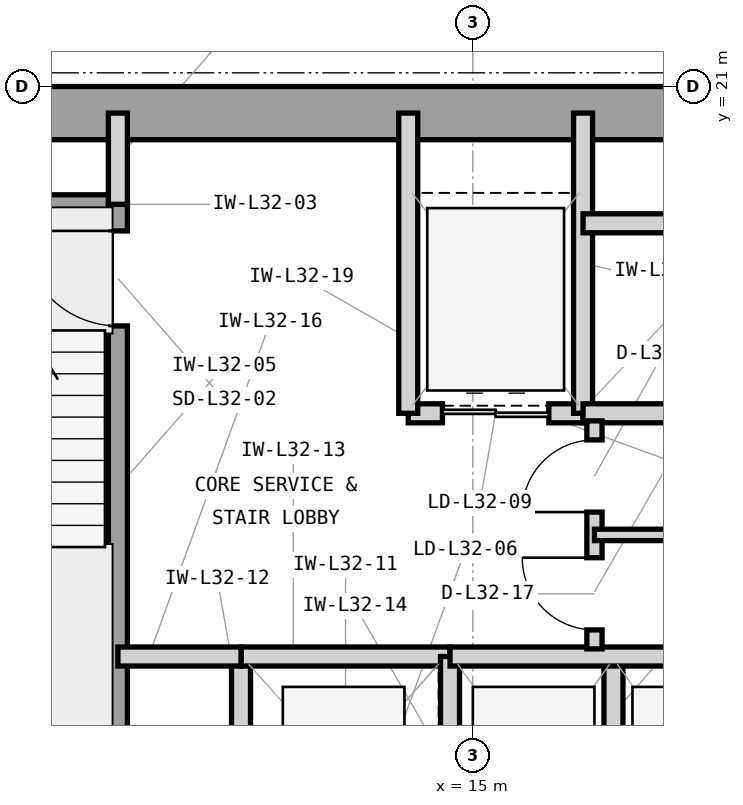
"""IFC4 building model, lengths in metres.
Left out: names, types, materials, properties, quantities, classifications, styles, units other than length and angle.
Written with IfcOpenShell. Run it as: python <this file> out.ifc"""

import sys

from ifc_helpers import new_model, si_unit, direction, frame, frame_2d, origin, place, context, subcontext, project, spatial, rectangle, extrude, element, fill, save


model = new_model("IFC4")
c1 = context("Model", 3, precision=1e-05, world=origin(), true_north=direction((0.0, 1.0)))
c2 = subcontext(c1, "Body", "Model", "MODEL_VIEW")
j1 = project(units=[si_unit("LENGTHUNIT", "METRE"), si_unit("PLANEANGLEUNIT", "RADIAN")], contexts=[c1])
p1 = place(None, origin())
s1 = spatial("IfcSite", under=j1, at=p1, CompositionType="ELEMENT")
p2 = place(p1, origin())
s2 = spatial("IfcBuilding", under=s1, at=p2, CompositionType="ELEMENT")
p3 = place(p2, frame((0.0, 0.0, 136.2)))
s3 = spatial("IfcBuildingStorey", under=s2, at=p3, CompositionType="ELEMENT", Elevation=136.2)
p4 = place(p3, frame((7.475, 20.65, 0.0), z_axis=(0.0, 0.0, 1.0), x_axis=(1.0, 0.0, 0.0)))
e1 = element("IfcWall", 1, at=p4, inside=s3, PredefinedType="SHEAR", context=c2, shape_type="SweptSolid", body=[
    extrude(rectangle(XDim=12.325, YDim=0.7, at=frame_2d((6.163, 0.0))), origin(), (0.0, 0.0, 1.0), 3.9),
])
p5 = place(p3, frame((7.7, 19.45, 0.0), z_axis=(0.0, 0.0, 1.0), x_axis=(1.0, 0.0, 0.0)))
e2 = element("IfcWall", 2, at=p5, inside=s3, PredefinedType="SHEAR", context=c2, shape_type="SweptSolid", body=[
    extrude(rectangle(XDim=2.755, YDim=0.25, at=frame_2d((1.377, 0.0))), origin(), (0.0, 0.0, 1.0), 3.9),
])
p6 = place(p3, frame((10.33, 12.0, 0.0), z_axis=(0.0, 0.0, 1.0), x_axis=(0.0, 1.0, 0.0)))
e3 = element("IfcWall", 3, at=p6, inside=s3, PredefinedType="SHEAR", context=c2, shape_type="SweptSolid", body=[
    extrude(rectangle(XDim=7.45, YDim=0.25, at=frame_2d((3.725, 0.0))), origin(), (0.0, 0.0, 1.0), 3.9),
])
p7 = place(p6, frame((5.85, 0.0, 0.0)))
e4 = element("IfcOpeningElement", 4, at=p7, cuts=e3, PredefinedType="OPENING", context=c2, shape_type="SweptSolid", body=[
    extrude(rectangle(XDim=1.25, YDim=2.2, at=frame_2d((0.625, 1.1))), frame((0.0, 0.135, 0.0), z_axis=(0.0, -1.0, 0.0), x_axis=(1.0, 0.0, 0.0)), (0.0, 0.0, 1.0), 0.27),
])
p8 = place(p3, frame((10.33, 19.45, 0.0), z_axis=(0.0, 0.0, 1.0), x_axis=(0.0, 1.0, 0.0)))
e5 = element("IfcWall", 5, at=p8, inside=s3, PredefinedType="PARTITIONING", context=c2, shape_type="SweptSolid", body=[
    extrude(rectangle(XDim=1.2, YDim=0.25, at=frame_2d((0.6, 0.0))), origin(), (0.0, 0.0, 1.0), 2.994),
])
p9 = place(p3, frame((11.95, 10.5, 0.0), z_axis=(0.0, 0.0, 1.0), x_axis=(0.0, 1.0, 0.0)))
e6 = element("IfcWall", 6, at=p9, inside=s3, PredefinedType="PARTITIONING", context=c2, shape_type="SweptSolid", body=[
    extrude(rectangle(XDim=3.0, YDim=0.25, at=frame_2d((1.5, 0.0))), origin(), (0.0, 0.0, 1.0), 3.69),
])
p10 = place(p3, frame((11.95, 13.5, 0.0), z_axis=(0.0, 0.0, 1.0), x_axis=(1.0, 0.0, 0.0)))
e7 = element("IfcWall", 7, at=p10, inside=s3, PredefinedType="PARTITIONING", context=c2, shape_type="SweptSolid", body=[
    extrude(rectangle(XDim=2.75, YDim=0.25, at=frame_2d((1.375, 0.0))), origin(), (0.0, 0.0, 1.0), 3.233),
])
p11 = place(p3, frame((14.7, 10.5, 0.0), z_axis=(0.0, 0.0, 1.0), x_axis=(0.0, 1.0, 0.0)))
e8 = element("IfcWall", 8, at=p11, inside=s3, PredefinedType="PARTITIONING", context=c2, shape_type="SweptSolid", body=[
    extrude(rectangle(XDim=3.0, YDim=0.25, at=frame_2d((1.5, 0.0))), origin(), (0.0, 0.0, 1.0), 3.69),
])
p12 = place(p3, frame((10.33, 13.5, 0.0), z_axis=(0.0, 0.0, 1.0), x_axis=(1.0, 0.0, 0.0)))
e9 = element("IfcWall", 9, at=p12, inside=s3, PredefinedType="PARTITIONING", context=c2, shape_type="SweptSolid", body=[
    extrude(rectangle(XDim=1.62, YDim=0.25, at=frame_2d((0.81, 0.0))), origin(), (0.0, 0.0, 1.0), 3.233),
])
p13 = place(p3, frame((14.15, 16.7, 0.0), z_axis=(0.0, 0.0, 1.0), x_axis=(1.0, 0.0, 0.0)))
e10 = element("IfcWall", 10, at=p13, inside=s3, PredefinedType="PARTITIONING", context=c2, shape_type="SweptSolid", body=[
    extrude(rectangle(XDim=2.3, YDim=0.25, at=frame_2d((1.15, 0.0))), origin(), (0.0, 0.0, 1.0), 3.233),
])
p14 = place(p13, frame((0.45, 0.0, 0.0)))
e11 = element("IfcOpeningElement", 11, at=p14, cuts=e10, PredefinedType="OPENING", context=c2, shape_type="SweptSolid", body=[
    extrude(rectangle(XDim=1.4, YDim=2.35, at=frame_2d((0.7, 1.175))), frame((0.0, 0.135, 0.0), z_axis=(0.0, -1.0, 0.0), x_axis=(1.0, 0.0, 0.0)), (0.0, 0.0, 1.0), 0.27),
])
for number, where, z_axis, x_axis in (
    (12, (14.15, 16.7, 0.0), (0.0, 0.0, 1.0), (0.0, 1.0, 0.0)),
    (13, (16.45, 16.7, 0.0), (0.0, 0.0, 1.0), (0.0, 1.0, 0.0)),
):
    element("IfcWall", number, at=place(p3, frame(where, z_axis=z_axis, x_axis=x_axis)), inside=s3, PredefinedType="PARTITIONING", context=c2, shape_type="SweptSolid", body=[
        extrude(rectangle(XDim=3.95, YDim=0.25, at=frame_2d((1.975, 0.0))), origin(), (0.0, 0.0, 1.0), 3.69),
    ])
p15 = place(p3, frame((16.45, 16.7, 0.0), z_axis=(0.0, 0.0, 1.0), x_axis=(1.0, 0.0, 0.0)))
e14 = element("IfcWall", 14, at=p15, inside=s3, PredefinedType="PARTITIONING", context=c2, shape_type="SweptSolid", body=[
    extrude(rectangle(XDim=2.3, YDim=0.25, at=frame_2d((1.15, 0.0))), origin(), (0.0, 0.0, 1.0), 3.233),
])
p16 = place(p3, frame((16.45, 19.2, 0.0), z_axis=(0.0, 0.0, 1.0), x_axis=(1.0, 0.0, 0.0)))
e15 = element("IfcWall", 15, at=p16, inside=s3, PredefinedType="PARTITIONING", context=c2, shape_type="SweptSolid", body=[
    extrude(rectangle(XDim=7.2, YDim=0.25, at=frame_2d((3.6, 0.0))), origin(), (0.0, 0.0, 1.0), 3.69),
])
p17 = place(p3, frame((16.85, 10.5, 0.0), z_axis=(0.0, 0.0, 1.0), x_axis=(0.0, 1.0, 0.0)))
e16 = element("IfcWall", 16, at=p17, inside=s3, PredefinedType="PARTITIONING", context=c2, shape_type="SweptSolid", body=[
    extrude(rectangle(XDim=3.0, YDim=0.25, at=frame_2d((1.5, 0.0))), origin(), (0.0, 0.0, 1.0), 3.69),
])
p18 = place(p3, frame((14.7, 13.5, 0.0), z_axis=(0.0, 0.0, 1.0), x_axis=(1.0, 0.0, 0.0)))
e17 = element("IfcWall", 17, at=p18, inside=s3, PredefinedType="PARTITIONING", context=c2, shape_type="SweptSolid", body=[
    extrude(rectangle(XDim=8.95, YDim=0.25, at=frame_2d((4.475, 0.0))), origin(), (0.0, 0.0, 1.0), 3.233),
])
p19 = place(p3, frame((16.6, 13.6, 0.0), z_axis=(0.0, 0.0, 1.0), x_axis=(0.0, 1.0, 0.0)))
e18 = element("IfcWall", 18, at=p19, inside=s3, PredefinedType="PARTITIONING", context=c2, shape_type="SweptSolid", body=[
    extrude(rectangle(XDim=3.0, YDim=0.2, at=frame_2d((1.5, 0.0))), origin(), (0.0, 0.0, 1.0), 3.69),
])
p20 = place(p19, frame((0.25, 0.0, 0.0)))
e19 = element("IfcOpeningElement", 19, at=p20, cuts=e18, PredefinedType="OPENING", context=c2, shape_type="SweptSolid", body=[
    extrude(rectangle(XDim=0.95, YDim=2.1, at=frame_2d((0.475, 1.05))), frame((0.0, 0.11, 0.0), z_axis=(0.0, -1.0, 0.0), x_axis=(1.0, 0.0, 0.0)), (0.0, 0.0, 1.0), 0.22),
])
p21 = place(p19, frame((1.8, 0.0, 0.0)))
e20 = element("IfcOpeningElement", 20, at=p21, cuts=e18, PredefinedType="OPENING", context=c2, shape_type="SweptSolid", body=[
    extrude(rectangle(XDim=0.95, YDim=2.1, at=frame_2d((0.475, 1.05))), frame((0.0, 0.11, 0.0), z_axis=(0.0, -1.0, 0.0), x_axis=(1.0, 0.0, 0.0)), (0.0, 0.0, 1.0), 0.22),
])
p22 = place(p3, frame((16.6, 15.1, 0.0), z_axis=(0.0, 0.0, 1.0), x_axis=(1.0, 0.0, 0.0)))
e21 = element("IfcWall", 21, at=p22, inside=s3, PredefinedType="PARTITIONING", context=c2, shape_type="SweptSolid", body=[
    extrude(rectangle(XDim=7.05, YDim=0.15, at=frame_2d((3.525, 0.0))), origin(), (0.0, 0.0, 1.0), 3.69),
])
p23 = place(p7, origin())
e22 = element("IfcDoor", 22, at=p23, inside=s3, OperationType="SINGLE_SWING_RIGHT", PredefinedType="DOOR", context=c2, shape_type="SweptSolid", body=[
    extrude(rectangle(XDim=1.25, YDim=2.2, at=frame_2d((0.625, 1.1))), frame((0.0, 0.025, 0.0), z_axis=(0.0, -1.0, 0.0), x_axis=(1.0, 0.0, 0.0)), (0.0, 0.0, 1.0), 0.05),
])
fill(e4, e22)
p24 = place(p14, origin())
e23 = element("IfcDoor", 23, at=p24, inside=s3, OperationType="DOUBLE_DOOR_SLIDING", PredefinedType="DOOR", context=c2, shape_type="SweptSolid", body=[
    extrude(rectangle(XDim=1.4, YDim=2.35, at=frame_2d((0.7, 1.175))), frame((0.0, 0.025, 0.0), z_axis=(0.0, -1.0, 0.0), x_axis=(1.0, 0.0, 0.0)), (0.0, 0.0, 1.0), 0.05),
])
fill(e11, e23)
p25 = place(p20, origin())
e24 = element("IfcDoor", 24, at=p25, inside=s3, OperationType="SINGLE_SWING_RIGHT", PredefinedType="DOOR", context=c2, shape_type="SweptSolid", body=[
    extrude(rectangle(XDim=0.95, YDim=2.1, at=frame_2d((0.475, 1.05))), frame((0.0, 0.025, 0.0), z_axis=(0.0, -1.0, 0.0), x_axis=(1.0, 0.0, 0.0)), (0.0, 0.0, 1.0), 0.05),
])
fill(e19, e24)
p26 = place(p21, origin())
e25 = element("IfcDoor", 25, at=p26, inside=s3, OperationType="SINGLE_SWING_LEFT", PredefinedType="DOOR", context=c2, shape_type="SweptSolid", body=[
    extrude(rectangle(XDim=0.95, YDim=2.1, at=frame_2d((0.475, 1.05))), frame((0.0, 0.025, 0.0), z_axis=(0.0, -1.0, 0.0), x_axis=(1.0, 0.0, 0.0)), (0.0, 0.0, 1.0), 0.05),
])
fill(e20, e25)
save(model, sys.argv[1])
